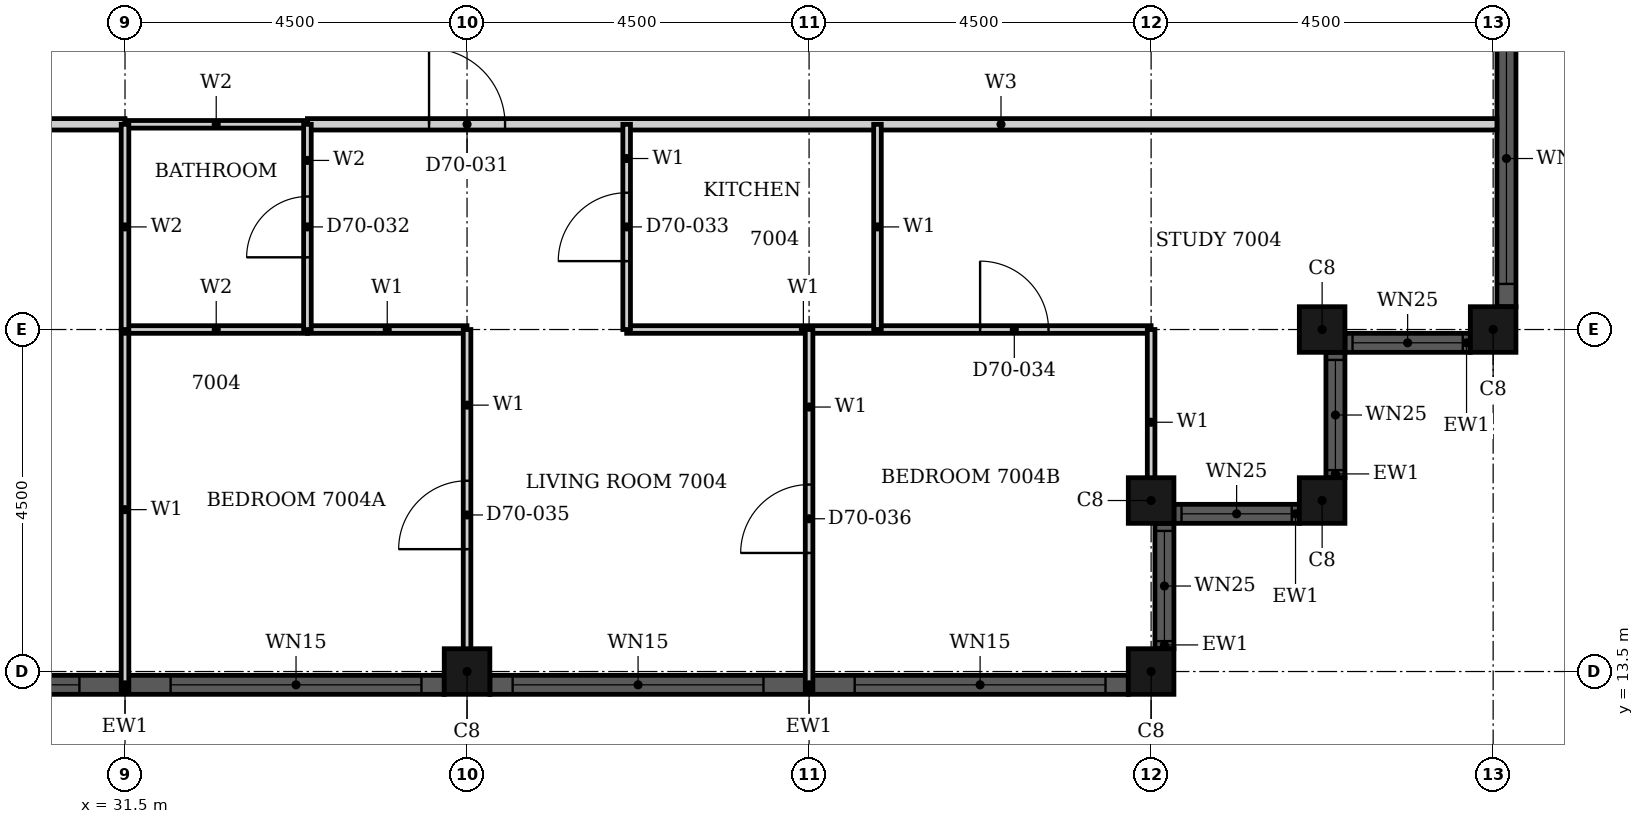
"""IFC4 building model, lengths in metres.
Left out: names, types, materials, properties, quantities, classifications, styles, units other than length and angle.
Written with IfcOpenShell. Run it as: python <this file> out.ifc"""

import sys

from ifc_helpers import new_model, si_unit, direction, frame, frame_2d, origin, origin_2d, place, context, subcontext, project, spatial, rectangle, hollow_rectangle, extrude, element, fill, save


model = new_model("IFC4")
c1 = context("Model", 3, precision=1e-05, world=origin(), true_north=direction((0.0, 1.0)))
c2 = subcontext(c1, "Body", "Model", "MODEL_VIEW")
j1 = project(units=[si_unit("LENGTHUNIT", "METRE"), si_unit("PLANEANGLEUNIT", "RADIAN")], contexts=[c1])
p1 = place(None, origin())
s1 = spatial("IfcSite", under=j1, at=p1, CompositionType="ELEMENT")
p2 = place(p1, origin())
s2 = spatial("IfcBuilding", under=s1, at=p2, CompositionType="ELEMENT")
p3 = place(p2, frame((0.0, 0.0, 274.9)))
s3 = spatial("IfcBuildingStorey", under=s2, at=p3, CompositionType="ELEMENT", Elevation=274.9)
for number, where, z_axis, x_axis in (
    (1, (36.0, 13.5, 0.0), (0.0, 0.0, 1.0), (1.0, 0.0, 0.0)),
    (2, (45.0, 13.5, 0.0), (0.0, 0.0, 1.0), (1.0, 0.0, 0.0)),
    (3, (45.0, 15.75, 0.0), (0.0, 0.0, 1.0), (1.0, 0.0, 0.0)),
    (4, (47.25, 15.75, 0.0), (0.0, 0.0, 1.0), (1.0, 0.0, 0.0)),
    (5, (47.25, 18.0, 0.0), (0.0, 0.0, 1.0), (1.0, 0.0, 0.0)),
    (6, (49.5, 18.0, 0.0), (0.0, 0.0, 1.0), (1.0, 0.0, 0.0)),
):
    element("IfcColumn", number, at=place(p3, frame(where, z_axis=z_axis, x_axis=x_axis)), inside=s3, PredefinedType="COLUMN", context=c2, shape_type="SweptSolid", body=[
        extrude(hollow_rectangle(XDim=0.6, YDim=0.6, WallThickness=0.02, at=origin_2d()), origin(), (0.0, 0.0, 1.0), 3.7),
    ])
p4 = place(p3, frame((27.3, 13.325, 0.0), z_axis=(0.0, 0.0, 1.0), x_axis=(1.0, 0.0, 0.0)))
e7 = element("IfcWall", 7, at=p4, inside=s3, PredefinedType="SOLIDWALL", context=c2, shape_type="SweptSolid", body=[
    extrude(rectangle(XDim=8.4, YDim=0.25, at=frame_2d((4.2, 0.0))), origin(), (0.0, 0.0, 1.0), 3.7),
])
p5 = place(p4, frame((0.3, 0.0, 0.45)))
e8 = element("IfcOpeningElement", 8, at=p5, cuts=e7, PredefinedType="OPENING", context=c2, shape_type="SweptSolid", body=[
    extrude(rectangle(XDim=3.3, YDim=2.3, at=frame_2d((1.65, 1.15))), frame((0.0, 0.135, 0.0), z_axis=(0.0, -1.0, 0.0), x_axis=(1.0, 0.0, 0.0)), (0.0, 0.0, 1.0), 0.27),
])
p6 = place(p4, frame((4.8, 0.0, 0.45)))
e9 = element("IfcOpeningElement", 9, at=p6, cuts=e7, PredefinedType="OPENING", context=c2, shape_type="SweptSolid", body=[
    extrude(rectangle(XDim=3.3, YDim=2.3, at=frame_2d((1.65, 1.15))), frame((0.0, 0.135, 0.0), z_axis=(0.0, -1.0, 0.0), x_axis=(1.0, 0.0, 0.0)), (0.0, 0.0, 1.0), 0.27),
])
p7 = place(p3, frame((36.3, 13.325, 0.0), z_axis=(0.0, 0.0, 1.0), x_axis=(1.0, 0.0, 0.0)))
e10 = element("IfcWall", 10, at=p7, inside=s3, PredefinedType="SOLIDWALL", context=c2, shape_type="SweptSolid", body=[
    extrude(rectangle(XDim=8.4, YDim=0.25, at=frame_2d((4.2, 0.0))), origin(), (0.0, 0.0, 1.0), 3.7),
])
p8 = place(p7, frame((0.3, 0.0, 0.45)))
e11 = element("IfcOpeningElement", 11, at=p8, cuts=e10, PredefinedType="OPENING", context=c2, shape_type="SweptSolid", body=[
    extrude(rectangle(XDim=3.3, YDim=2.3, at=frame_2d((1.65, 1.15))), frame((0.0, 0.135, 0.0), z_axis=(0.0, -1.0, 0.0), x_axis=(1.0, 0.0, 0.0)), (0.0, 0.0, 1.0), 0.27),
])
p9 = place(p7, frame((4.8, 0.0, 0.45)))
e12 = element("IfcOpeningElement", 12, at=p9, cuts=e10, PredefinedType="OPENING", context=c2, shape_type="SweptSolid", body=[
    extrude(rectangle(XDim=3.3, YDim=2.3, at=frame_2d((1.65, 1.15))), frame((0.0, 0.135, 0.0), z_axis=(0.0, -1.0, 0.0), x_axis=(1.0, 0.0, 0.0)), (0.0, 0.0, 1.0), 0.27),
])
p10 = place(p3, frame((45.175, 13.8, 0.0), z_axis=(0.0, 0.0, 1.0), x_axis=(0.0, 1.0, 0.0)))
e13 = element("IfcWall", 13, at=p10, inside=s3, PredefinedType="SOLIDWALL", context=c2, shape_type="SweptSolid", body=[
    extrude(rectangle(XDim=1.65, YDim=0.25, at=frame_2d((0.825, 0.0))), origin(), (0.0, 0.0, 1.0), 3.7),
])
p11 = place(p10, frame((0.1, 0.0, 0.9)))
e14 = element("IfcOpeningElement", 14, at=p11, cuts=e13, PredefinedType="OPENING", context=c2, shape_type="SweptSolid", body=[
    extrude(rectangle(XDim=1.45, YDim=1.85, at=frame_2d((0.725, 0.925))), frame((0.0, 0.135, 0.0), z_axis=(0.0, -1.0, 0.0), x_axis=(1.0, 0.0, 0.0)), (0.0, 0.0, 1.0), 0.27),
])
p12 = place(p3, frame((45.3, 15.575, 0.0), z_axis=(0.0, 0.0, 1.0), x_axis=(1.0, 0.0, 0.0)))
e15 = element("IfcWall", 15, at=p12, inside=s3, PredefinedType="SOLIDWALL", context=c2, shape_type="SweptSolid", body=[
    extrude(rectangle(XDim=1.65, YDim=0.25, at=frame_2d((0.825, 0.0))), origin(), (0.0, 0.0, 1.0), 3.7),
])
p13 = place(p12, frame((0.1, 0.0, 0.9)))
e16 = element("IfcOpeningElement", 16, at=p13, cuts=e15, PredefinedType="OPENING", context=c2, shape_type="SweptSolid", body=[
    extrude(rectangle(XDim=1.45, YDim=1.85, at=frame_2d((0.725, 0.925))), frame((0.0, 0.135, 0.0), z_axis=(0.0, -1.0, 0.0), x_axis=(1.0, 0.0, 0.0)), (0.0, 0.0, 1.0), 0.27),
])
p14 = place(p3, frame((47.425, 16.05, 0.0), z_axis=(0.0, 0.0, 1.0), x_axis=(0.0, 1.0, 0.0)))
e17 = element("IfcWall", 17, at=p14, inside=s3, PredefinedType="SOLIDWALL", context=c2, shape_type="SweptSolid", body=[
    extrude(rectangle(XDim=1.65, YDim=0.25, at=frame_2d((0.825, 0.0))), origin(), (0.0, 0.0, 1.0), 3.7),
])
p15 = place(p14, frame((0.1, 0.0, 0.9)))
e18 = element("IfcOpeningElement", 18, at=p15, cuts=e17, PredefinedType="OPENING", context=c2, shape_type="SweptSolid", body=[
    extrude(rectangle(XDim=1.45, YDim=1.85, at=frame_2d((0.725, 0.925))), frame((0.0, 0.135, 0.0), z_axis=(0.0, -1.0, 0.0), x_axis=(1.0, 0.0, 0.0)), (0.0, 0.0, 1.0), 0.27),
])
p16 = place(p3, frame((47.55, 17.825, 0.0), z_axis=(0.0, 0.0, 1.0), x_axis=(1.0, 0.0, 0.0)))
e19 = element("IfcWall", 19, at=p16, inside=s3, PredefinedType="SOLIDWALL", context=c2, shape_type="SweptSolid", body=[
    extrude(rectangle(XDim=1.65, YDim=0.25, at=frame_2d((0.825, 0.0))), origin(), (0.0, 0.0, 1.0), 3.7),
])
p17 = place(p16, frame((0.1, 0.0, 0.9)))
e20 = element("IfcOpeningElement", 20, at=p17, cuts=e19, PredefinedType="OPENING", context=c2, shape_type="SweptSolid", body=[
    extrude(rectangle(XDim=1.45, YDim=1.85, at=frame_2d((0.725, 0.925))), frame((0.0, 0.135, 0.0), z_axis=(0.0, -1.0, 0.0), x_axis=(1.0, 0.0, 0.0)), (0.0, 0.0, 1.0), 0.27),
])
p18 = place(p3, frame((49.675, 18.3, 0.0), z_axis=(0.0, 0.0, 1.0), x_axis=(0.0, 1.0, 0.0)))
e21 = element("IfcWall", 21, at=p18, inside=s3, PredefinedType="SOLIDWALL", context=c2, shape_type="SweptSolid", body=[
    extrude(rectangle(XDim=8.4, YDim=0.25, at=frame_2d((4.2, 0.0))), origin(), (0.0, 0.0, 1.0), 3.7),
])
p19 = place(p18, frame((0.3, 0.0, 0.45)))
e22 = element("IfcOpeningElement", 22, at=p19, cuts=e21, PredefinedType="OPENING", context=c2, shape_type="SweptSolid", body=[
    extrude(rectangle(XDim=3.3, YDim=2.3, at=frame_2d((1.65, 1.15))), frame((0.0, 0.135, 0.0), z_axis=(0.0, -1.0, 0.0), x_axis=(1.0, 0.0, 0.0)), (0.0, 0.0, 1.0), 0.27),
])
p20 = place(p18, frame((4.8, 0.0, 0.45)))
e23 = element("IfcOpeningElement", 23, at=p20, cuts=e21, PredefinedType="OPENING", context=c2, shape_type="SweptSolid", body=[
    extrude(rectangle(XDim=3.3, YDim=2.3, at=frame_2d((1.65, 1.15))), frame((0.0, 0.135, 0.0), z_axis=(0.0, -1.0, 0.0), x_axis=(1.0, 0.0, 0.0)), (0.0, 0.0, 1.0), 0.27),
])
p21 = place(p3, frame((18.0, 20.7, 0.0), z_axis=(0.0, 0.0, 1.0), x_axis=(1.0, 0.0, 0.0)))
e24 = element("IfcWall", 24, at=p21, inside=s3, PredefinedType="PARTITIONING", context=c2, shape_type="SweptSolid", body=[
    extrude(rectangle(XDim=13.5, YDim=0.15, at=frame_2d((6.75, 0.0))), origin(), (0.0, 0.0, 1.0), 3.3),
])
p22 = place(p21, frame((6.25, 0.0, 0.0)))
e25 = element("IfcOpeningElement", 25, at=p22, cuts=e24, PredefinedType="OPENING", context=c2, shape_type="SweptSolid", body=[
    extrude(rectangle(XDim=1.0, YDim=2.1, at=frame_2d((0.5, 1.05))), frame((0.0, 0.085, 0.0), z_axis=(0.0, -1.0, 0.0), x_axis=(1.0, 0.0, 0.0)), (0.0, 0.0, 1.0), 0.17),
])
p23 = place(p3, frame((33.9, 20.7, 0.0), z_axis=(0.0, 0.0, 1.0), x_axis=(1.0, 0.0, 0.0)))
e26 = element("IfcWall", 26, at=p23, inside=s3, PredefinedType="PARTITIONING", context=c2, shape_type="SweptSolid", body=[
    extrude(rectangle(XDim=15.65, YDim=0.15, at=frame_2d((7.825, 0.0))), origin(), (0.0, 0.0, 1.0), 3.3),
])
p24 = place(p23, frame((1.6, 0.0, 0.0)))
e27 = element("IfcOpeningElement", 27, at=p24, cuts=e26, PredefinedType="OPENING", context=c2, shape_type="SweptSolid", body=[
    extrude(rectangle(XDim=1.0, YDim=2.2, at=frame_2d((0.5, 1.1))), frame((0.0, 0.085, 0.0), z_axis=(0.0, -1.0, 0.0), x_axis=(1.0, 0.0, 0.0)), (0.0, 0.0, 1.0), 0.17),
])
p25 = place(p3, frame((33.9, 18.0, 0.0), z_axis=(0.0, 0.0, 1.0), x_axis=(1.0, 0.0, 0.0)))
e28 = element("IfcWall", 28, at=p25, inside=s3, PredefinedType="PARTITIONING", context=c2, shape_type="SweptSolid", body=[
    extrude(rectangle(XDim=2.1, YDim=0.1, at=frame_2d((1.05, 0.0))), origin(), (0.0, 0.0, 1.0), 3.3),
])
p26 = place(p3, frame((38.1, 18.0, 0.0), z_axis=(0.0, 0.0, 1.0), x_axis=(1.0, 0.0, 0.0)))
e29 = element("IfcWall", 29, at=p26, inside=s3, PredefinedType="PARTITIONING", context=c2, shape_type="SweptSolid", body=[
    extrude(rectangle(XDim=6.9, YDim=0.1, at=frame_2d((3.45, 0.0))), origin(), (0.0, 0.0, 1.0), 3.3),
])
p27 = place(p26, frame((4.65, 0.0, 0.0)))
e30 = element("IfcOpeningElement", 30, at=p27, cuts=e29, PredefinedType="OPENING", context=c2, shape_type="SweptSolid", body=[
    extrude(rectangle(XDim=0.9, YDim=2.1, at=frame_2d((0.45, 1.05))), frame((0.0, 0.06, 0.0), z_axis=(0.0, -1.0, 0.0), x_axis=(1.0, 0.0, 0.0)), (0.0, 0.0, 1.0), 0.12),
])
p28 = place(p3, frame((31.5, 13.26, 0.0), z_axis=(0.0, 0.0, 1.0), x_axis=(0.0, 1.0, 0.0)))
e31 = element("IfcWall", 31, at=p28, inside=s3, PredefinedType="PARTITIONING", context=c2, shape_type="SweptSolid", body=[
    extrude(rectangle(XDim=4.74, YDim=0.1, at=frame_2d((2.37, 0.0))), origin(), (0.0, 0.0, 1.0), 3.3),
])
p29 = place(p3, frame((36.0, 13.31, 0.0), z_axis=(0.0, 0.0, 1.0), x_axis=(0.0, 1.0, 0.0)))
e32 = element("IfcWall", 32, at=p29, inside=s3, PredefinedType="PARTITIONING", context=c2, shape_type="SweptSolid", body=[
    extrude(rectangle(XDim=4.69, YDim=0.1, at=frame_2d((2.345, 0.0))), origin(), (0.0, 0.0, 1.0), 3.3),
])
p30 = place(p29, frame((1.8, 0.0, 0.0)))
e33 = element("IfcOpeningElement", 33, at=p30, cuts=e32, PredefinedType="OPENING", context=c2, shape_type="SweptSolid", body=[
    extrude(rectangle(XDim=0.9, YDim=2.1, at=frame_2d((0.45, 1.05))), frame((0.0, 0.06, 0.0), z_axis=(0.0, -1.0, 0.0), x_axis=(1.0, 0.0, 0.0)), (0.0, 0.0, 1.0), 0.12),
])
p31 = place(p3, frame((38.1, 18.0, 0.0), z_axis=(0.0, 0.0, 1.0), x_axis=(0.0, 1.0, 0.0)))
e34 = element("IfcWall", 34, at=p31, inside=s3, PredefinedType="PARTITIONING", context=c2, shape_type="SweptSolid", body=[
    extrude(rectangle(XDim=2.7, YDim=0.1, at=frame_2d((1.35, 0.0))), origin(), (0.0, 0.0, 1.0), 3.3),
])
p32 = place(p31, frame((0.9, 0.0, 0.0)))
e35 = element("IfcOpeningElement", 35, at=p32, cuts=e34, PredefinedType="OPENING", context=c2, shape_type="SweptSolid", body=[
    extrude(rectangle(XDim=0.9, YDim=2.1, at=frame_2d((0.45, 1.05))), frame((0.0, 0.06, 0.0), z_axis=(0.0, -1.0, 0.0), x_axis=(1.0, 0.0, 0.0)), (0.0, 0.0, 1.0), 0.12),
])
p33 = place(p3, frame((40.5, 13.26, 0.0), z_axis=(0.0, 0.0, 1.0), x_axis=(0.0, 1.0, 0.0)))
e36 = element("IfcWall", 36, at=p33, inside=s3, PredefinedType="PARTITIONING", context=c2, shape_type="SweptSolid", body=[
    extrude(rectangle(XDim=4.74, YDim=0.1, at=frame_2d((2.37, 0.0))), origin(), (0.0, 0.0, 1.0), 3.3),
])
p34 = place(p33, frame((1.8, 0.0, 0.0)))
e37 = element("IfcOpeningElement", 37, at=p34, cuts=e36, PredefinedType="OPENING", context=c2, shape_type="SweptSolid", body=[
    extrude(rectangle(XDim=0.9, YDim=2.1, at=frame_2d((0.45, 1.05))), frame((0.0, 0.06, 0.0), z_axis=(0.0, -1.0, 0.0), x_axis=(1.0, 0.0, 0.0)), (0.0, 0.0, 1.0), 0.12),
])
p35 = place(p3, frame((41.4, 18.0, 0.0), z_axis=(0.0, 0.0, 1.0), x_axis=(0.0, 1.0, 0.0)))
e38 = element("IfcWall", 38, at=p35, inside=s3, PredefinedType="PARTITIONING", context=c2, shape_type="SweptSolid", body=[
    extrude(rectangle(XDim=2.7, YDim=0.1, at=frame_2d((1.35, 0.0))), origin(), (0.0, 0.0, 1.0), 3.3),
])
p36 = place(p3, frame((45.0, 15.56, 0.0), z_axis=(0.0, 0.0, 1.0), x_axis=(0.0, 1.0, 0.0)))
e39 = element("IfcWall", 39, at=p36, inside=s3, PredefinedType="PARTITIONING", context=c2, shape_type="SweptSolid", body=[
    extrude(rectangle(XDim=2.44, YDim=0.1, at=frame_2d((1.22, 0.0))), origin(), (0.0, 0.0, 1.0), 3.3),
])
for number, where, z_axis, x_axis in (
    (40, (31.5, 18.0, 0.0), (0.0, 0.0, 1.0), (1.0, 0.0, 0.0)),
    (41, (31.5, 20.7, 0.0), (0.0, 0.0, 1.0), (1.0, 0.0, 0.0)),
):
    element("IfcWall", number, at=place(p3, frame(where, z_axis=z_axis, x_axis=x_axis)), inside=s3, PredefinedType="PARTITIONING", context=c2, shape_type="SweptSolid", body=[
        extrude(rectangle(XDim=2.4, YDim=0.1, at=frame_2d((1.2, 0.0))), origin(), (0.0, 0.0, 1.0), 3.3),
    ])
p37 = place(p3, frame((31.5, 18.0, 0.0), z_axis=(0.0, 0.0, 1.0), x_axis=(0.0, 1.0, 0.0)))
e42 = element("IfcWall", 42, at=p37, inside=s3, PredefinedType="PARTITIONING", context=c2, shape_type="SweptSolid", body=[
    extrude(rectangle(XDim=2.7, YDim=0.1, at=frame_2d((1.35, 0.0))), origin(), (0.0, 0.0, 1.0), 3.3),
])
p38 = place(p3, frame((33.9, 18.0, 0.0), z_axis=(0.0, 0.0, 1.0), x_axis=(0.0, 1.0, 0.0)))
e43 = element("IfcWall", 43, at=p38, inside=s3, PredefinedType="PARTITIONING", context=c2, shape_type="SweptSolid", body=[
    extrude(rectangle(XDim=2.7, YDim=0.1, at=frame_2d((1.35, 0.0))), origin(), (0.0, 0.0, 1.0), 3.3),
])
p39 = place(p38, frame((0.95, 0.0, 0.0)))
e44 = element("IfcOpeningElement", 44, at=p39, cuts=e43, PredefinedType="OPENING", context=c2, shape_type="SweptSolid", body=[
    extrude(rectangle(XDim=0.8, YDim=2.1, at=frame_2d((0.4, 1.05))), frame((0.0, 0.06, 0.0), z_axis=(0.0, -1.0, 0.0), x_axis=(1.0, 0.0, 0.0)), (0.0, 0.0, 1.0), 0.12),
])
p40 = place(p5, origin())
e45 = element("IfcWindow", 45, at=p40, inside=s3, PartitioningType="SINGLE_PANEL", PredefinedType="WINDOW", context=c2, shape_type="SweptSolid", body=[
    extrude(rectangle(XDim=3.3, YDim=2.3, at=frame_2d((1.65, 1.15))), frame((0.0, 0.03, 0.0), z_axis=(0.0, -1.0, 0.0), x_axis=(1.0, 0.0, 0.0)), (0.0, 0.0, 1.0), 0.06),
])
fill(e8, e45)
p41 = place(p6, origin())
e46 = element("IfcWindow", 46, at=p41, inside=s3, PartitioningType="SINGLE_PANEL", PredefinedType="WINDOW", context=c2, shape_type="SweptSolid", body=[
    extrude(rectangle(XDim=3.3, YDim=2.3, at=frame_2d((1.65, 1.15))), frame((0.0, 0.03, 0.0), z_axis=(0.0, -1.0, 0.0), x_axis=(1.0, 0.0, 0.0)), (0.0, 0.0, 1.0), 0.06),
])
fill(e9, e46)
p42 = place(p8, origin())
e47 = element("IfcWindow", 47, at=p42, inside=s3, PartitioningType="SINGLE_PANEL", PredefinedType="WINDOW", context=c2, shape_type="SweptSolid", body=[
    extrude(rectangle(XDim=3.3, YDim=2.3, at=frame_2d((1.65, 1.15))), frame((0.0, 0.03, 0.0), z_axis=(0.0, -1.0, 0.0), x_axis=(1.0, 0.0, 0.0)), (0.0, 0.0, 1.0), 0.06),
])
fill(e11, e47)
p43 = place(p9, origin())
e48 = element("IfcWindow", 48, at=p43, inside=s3, PartitioningType="SINGLE_PANEL", PredefinedType="WINDOW", context=c2, shape_type="SweptSolid", body=[
    extrude(rectangle(XDim=3.3, YDim=2.3, at=frame_2d((1.65, 1.15))), frame((0.0, 0.03, 0.0), z_axis=(0.0, -1.0, 0.0), x_axis=(1.0, 0.0, 0.0)), (0.0, 0.0, 1.0), 0.06),
])
fill(e12, e48)
p44 = place(p11, origin())
e49 = element("IfcWindow", 49, at=p44, inside=s3, PartitioningType="SINGLE_PANEL", PredefinedType="WINDOW", context=c2, shape_type="SweptSolid", body=[
    extrude(rectangle(XDim=1.45, YDim=1.85, at=frame_2d((0.725, 0.925))), frame((0.0, 0.03, 0.0), z_axis=(0.0, -1.0, 0.0), x_axis=(1.0, 0.0, 0.0)), (0.0, 0.0, 1.0), 0.06),
])
fill(e14, e49)
p45 = place(p13, origin())
e50 = element("IfcWindow", 50, at=p45, inside=s3, PartitioningType="SINGLE_PANEL", PredefinedType="WINDOW", context=c2, shape_type="SweptSolid", body=[
    extrude(rectangle(XDim=1.45, YDim=1.85, at=frame_2d((0.725, 0.925))), frame((0.0, 0.03, 0.0), z_axis=(0.0, -1.0, 0.0), x_axis=(1.0, 0.0, 0.0)), (0.0, 0.0, 1.0), 0.06),
])
fill(e16, e50)
p46 = place(p15, origin())
e51 = element("IfcWindow", 51, at=p46, inside=s3, PartitioningType="SINGLE_PANEL", PredefinedType="WINDOW", context=c2, shape_type="SweptSolid", body=[
    extrude(rectangle(XDim=1.45, YDim=1.85, at=frame_2d((0.725, 0.925))), frame((0.0, 0.03, 0.0), z_axis=(0.0, -1.0, 0.0), x_axis=(1.0, 0.0, 0.0)), (0.0, 0.0, 1.0), 0.06),
])
fill(e18, e51)
p47 = place(p17, origin())
e52 = element("IfcWindow", 52, at=p47, inside=s3, PartitioningType="SINGLE_PANEL", PredefinedType="WINDOW", context=c2, shape_type="SweptSolid", body=[
    extrude(rectangle(XDim=1.45, YDim=1.85, at=frame_2d((0.725, 0.925))), frame((0.0, 0.03, 0.0), z_axis=(0.0, -1.0, 0.0), x_axis=(1.0, 0.0, 0.0)), (0.0, 0.0, 1.0), 0.06),
])
fill(e20, e52)
p48 = place(p19, origin())
e53 = element("IfcWindow", 53, at=p48, inside=s3, PartitioningType="SINGLE_PANEL", PredefinedType="WINDOW", context=c2, shape_type="SweptSolid", body=[
    extrude(rectangle(XDim=3.3, YDim=2.3, at=frame_2d((1.65, 1.15))), frame((0.0, 0.03, 0.0), z_axis=(0.0, -1.0, 0.0), x_axis=(1.0, 0.0, 0.0)), (0.0, 0.0, 1.0), 0.06),
])
fill(e22, e53)
p49 = place(p24, origin())
e54 = element("IfcDoor", 54, at=p49, inside=s3, OperationType="SINGLE_SWING_RIGHT", PredefinedType="DOOR", context=c2, shape_type="SweptSolid", body=[
    extrude(rectangle(XDim=1.0, YDim=2.2, at=frame_2d((0.5, 1.1))), frame((0.0, 0.025, 0.0), z_axis=(0.0, -1.0, 0.0), x_axis=(1.0, 0.0, 0.0)), (0.0, 0.0, 1.0), 0.05),
])
fill(e27, e54)
p50 = place(p39, origin())
e55 = element("IfcDoor", 55, at=p50, inside=s3, OperationType="SINGLE_SWING_LEFT", PredefinedType="DOOR", context=c2, shape_type="SweptSolid", body=[
    extrude(rectangle(XDim=0.8, YDim=2.1, at=frame_2d((0.4, 1.05))), frame((0.0, 0.025, 0.0), z_axis=(0.0, -1.0, 0.0), x_axis=(1.0, 0.0, 0.0)), (0.0, 0.0, 1.0), 0.05),
])
fill(e44, e55)
p51 = place(p32, origin())
e56 = element("IfcDoor", 56, at=p51, inside=s3, OperationType="SINGLE_SWING_LEFT", PredefinedType="DOOR", context=c2, shape_type="SweptSolid", body=[
    extrude(rectangle(XDim=0.9, YDim=2.1, at=frame_2d((0.45, 1.05))), frame((0.0, 0.025, 0.0), z_axis=(0.0, -1.0, 0.0), x_axis=(1.0, 0.0, 0.0)), (0.0, 0.0, 1.0), 0.05),
])
fill(e35, e56)
p52 = place(p27, origin())
e57 = element("IfcDoor", 57, at=p52, inside=s3, OperationType="SINGLE_SWING_LEFT", PredefinedType="DOOR", context=c2, shape_type="SweptSolid", body=[
    extrude(rectangle(XDim=0.9, YDim=2.1, at=frame_2d((0.45, 1.05))), frame((0.0, 0.025, 0.0), z_axis=(0.0, -1.0, 0.0), x_axis=(1.0, 0.0, 0.0)), (0.0, 0.0, 1.0), 0.05),
])
fill(e30, e57)
p53 = place(p30, origin())
e58 = element("IfcDoor", 58, at=p53, inside=s3, OperationType="SINGLE_SWING_LEFT", PredefinedType="DOOR", context=c2, shape_type="SweptSolid", body=[
    extrude(rectangle(XDim=0.9, YDim=2.1, at=frame_2d((0.45, 1.05))), frame((0.0, 0.025, 0.0), z_axis=(0.0, -1.0, 0.0), x_axis=(1.0, 0.0, 0.0)), (0.0, 0.0, 1.0), 0.05),
])
fill(e33, e58)
p54 = place(p34, origin())
e59 = element("IfcDoor", 59, at=p54, inside=s3, OperationType="SINGLE_SWING_LEFT", PredefinedType="DOOR", context=c2, shape_type="SweptSolid", body=[
    extrude(rectangle(XDim=0.9, YDim=2.1, at=frame_2d((0.45, 1.05))), frame((0.0, 0.025, 0.0), z_axis=(0.0, -1.0, 0.0), x_axis=(1.0, 0.0, 0.0)), (0.0, 0.0, 1.0), 0.05),
])
fill(e37, e59)
save(model, sys.argv[1])
